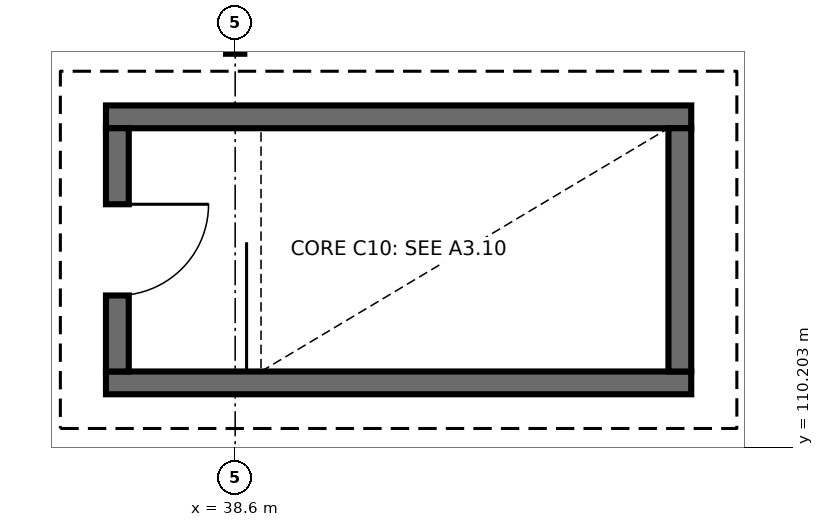
"""IFC4 building model, lengths in metres.
Left out: names, types, materials, properties, quantities, classifications, styles, units other than length and angle.
Written with IfcOpenShell. Run it as: python <this file> out.ifc"""

import sys

from ifc_helpers import new_model, si_unit, direction, frame, frame_2d, origin, origin_2d, place, context, subcontext, project, spatial, rectangle, i_section, extrude, element, fill, save


model = new_model("IFC4")
c1 = context("Model", 3, precision=1e-05, world=origin(), true_north=direction((0.0, 1.0)))
c2 = subcontext(c1, "Body", "Model", "MODEL_VIEW")
j1 = project(units=[si_unit("LENGTHUNIT", "METRE"), si_unit("PLANEANGLEUNIT", "RADIAN")], contexts=[c1])
p1 = place(None, origin())
s1 = spatial("IfcSite", under=j1, at=p1, CompositionType="ELEMENT")
p2 = place(p1, origin())
s2 = spatial("IfcBuilding", under=s1, at=p2, CompositionType="ELEMENT")
p3 = place(p2, frame((0.0, 0.0, 26.7)))
s3 = spatial("IfcBuildingStorey", under=s2, at=p3, CompositionType="ELEMENT", Elevation=26.7)
p4 = place(p3, frame((38.6, 115.5, 0.0), z_axis=(0.0, 0.0, 1.0), x_axis=(1.0, 0.0, 0.0)))
e1 = element("IfcColumn", 1, at=p4, inside=s3, PredefinedType="COLUMN", context=c2, shape_type="SweptSolid", body=[
    extrude(i_section(OverallWidth=0.24, OverallDepth=0.24, WebThickness=0.01, FlangeThickness=0.017, FilletRadius=0.021, at=origin_2d()), origin(), (0.0, 0.0, 1.0), 3.9),
])
for number, where, z_axis, x_axis in (
    (2, (36.9, 111.05, 0.0), (0.0, 0.0, 1.0), (1.0, 0.0, 0.0)),
    (3, (44.6, 114.55, 0.0), (0.0, 0.0, 1.0), (-1.0, 0.0, 0.0)),
):
    element("IfcWall", number, at=place(p3, frame(where, z_axis=z_axis, x_axis=x_axis)), inside=s3, PredefinedType="SHEAR", context=c2, shape_type="SweptSolid", body=[
        extrude(rectangle(XDim=7.7, YDim=0.3, at=frame_2d((3.85, 0.0))), origin(), (0.0, 0.0, 1.0), 3.9),
    ])
p5 = place(p3, frame((37.05, 114.4, 0.0), z_axis=(0.0, 0.0, 1.0), x_axis=(0.0, -1.0, 0.0)))
e4 = element("IfcWall", 4, at=p5, inside=s3, PredefinedType="SHEAR", context=c2, shape_type="SweptSolid", body=[
    extrude(rectangle(XDim=3.2, YDim=0.3, at=frame_2d((1.6, 0.0))), origin(), (0.0, 0.0, 1.0), 3.9),
])
p6 = place(p5, frame((1.0, 0.0, 0.0)))
e5 = element("IfcOpeningElement", 5, at=p6, cuts=e4, PredefinedType="OPENING", context=c2, shape_type="SweptSolid", body=[
    extrude(rectangle(XDim=1.2, YDim=2.15, at=frame_2d((0.6, 1.075))), frame((0.0, 0.16, 0.0), z_axis=(0.0, -1.0, 0.0), x_axis=(1.0, 0.0, 0.0)), (0.0, 0.0, 1.0), 0.32),
])
p7 = place(p3, frame((44.45, 111.2, 0.0), z_axis=(0.0, 0.0, 1.0), x_axis=(0.0, 1.0, 0.0)))
e6 = element("IfcWall", 6, at=p7, inside=s3, PredefinedType="SHEAR", context=c2, shape_type="SweptSolid", body=[
    extrude(rectangle(XDim=3.2, YDim=0.3, at=frame_2d((1.6, 0.0))), origin(), (0.0, 0.0, 1.0), 3.9),
])
p8 = place(p6, origin())
e7 = element("IfcDoor", 7, at=p8, inside=s3, OperationType="SINGLE_SWING_LEFT", PredefinedType="DOOR", context=c2, shape_type="SweptSolid", body=[
    extrude(rectangle(XDim=1.2, YDim=2.15, at=frame_2d((0.6, 1.075))), frame((0.0, 0.025, 0.0), z_axis=(0.0, -1.0, 0.0), x_axis=(1.0, 0.0, 0.0)), (0.0, 0.0, 1.0), 0.05),
])
fill(e5, e7)
save(model, sys.argv[1])
